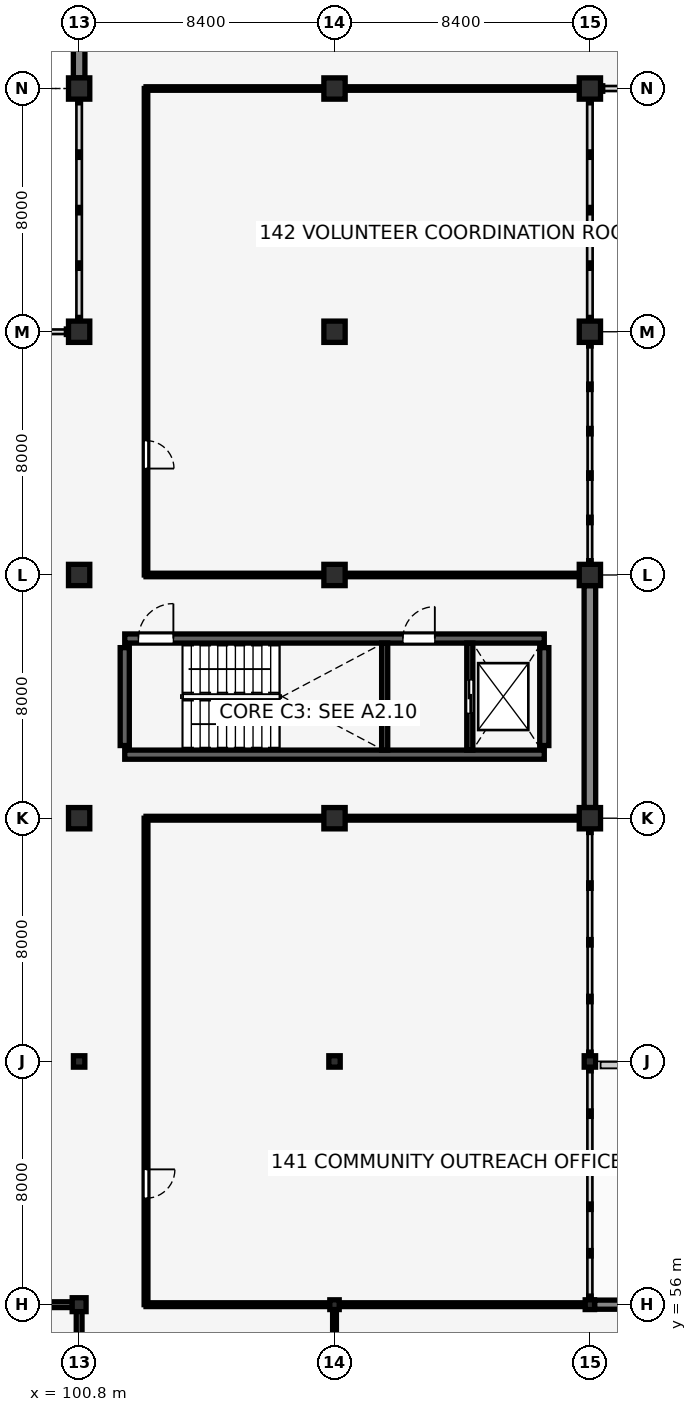
"""IFC4 building model, lengths in metres.
Left out: names, types, materials, properties, quantities, classifications, styles, units other than length and angle.
Written with IfcOpenShell. Run it as: python <this file> out.ifc"""

import sys

from ifc_helpers import new_model, si_unit, direction, frame, frame_2d, origin, origin_2d, place, context, subcontext, project, spatial, rectangle, hollow_circle, i_section, extrude, element, fill, save


model = new_model("IFC4")
c1 = context("Model", 3, precision=1e-05, world=origin(), true_north=direction((0.0, 1.0)))
c2 = subcontext(c1, "Body", "Model", "MODEL_VIEW")
j1 = project(units=[si_unit("LENGTHUNIT", "METRE"), si_unit("PLANEANGLEUNIT", "RADIAN")], contexts=[c1])
p1 = place(None, origin())
s1 = spatial("IfcSite", under=j1, at=p1, CompositionType="ELEMENT")
p2 = place(p1, origin())
s2 = spatial("IfcBuilding", under=s1, at=p2, CompositionType="ELEMENT")
p3 = place(p2, frame((0.0, 0.0, 5.44)))
s3 = spatial("IfcBuildingStorey", under=s2, at=p3, CompositionType="ELEMENT", Elevation=5.44)
p4 = place(p3, frame((102.3, 74.09, 0.0), z_axis=(0.0, 0.0, 1.0), x_axis=(1.0, 0.0, 0.0)))
e1 = element("IfcWall", 1, at=p4, inside=s3, PredefinedType="SHEAR", context=c2, shape_type="SweptSolid", body=[
    extrude(rectangle(XDim=13.8, YDim=0.3, at=frame_2d((6.9, 0.0))), origin(), (0.0, 0.0, 1.0), 3.8),
])
p5 = place(p3, frame((102.3, 77.91, 0.0), z_axis=(0.0, 0.0, 1.0), x_axis=(1.0, 0.0, 0.0)))
e2 = element("IfcWall", 2, at=p5, inside=s3, PredefinedType="SHEAR", context=c2, shape_type="SweptSolid", body=[
    extrude(rectangle(XDim=13.8, YDim=0.3, at=frame_2d((6.9, 0.0))), origin(), (0.0, 0.0, 1.0), 3.8),
])
p6 = place(p5, frame((0.45, 0.0, 0.0), z_axis=(0.0, 0.0, 1.0), x_axis=(1.0, 0.0, 0.0)))
e3 = element("IfcOpeningElement", 3, at=p6, cuts=e2, PredefinedType="OPENING", context=c2, shape_type="SweptSolid", body=[
    extrude(rectangle(XDim=1.15, YDim=2.15, at=frame_2d((0.575, 1.075))), frame((0.0, 0.16, 0.0), z_axis=(0.0, -1.0, 0.0), x_axis=(1.0, 0.0, 0.0)), (0.0, 0.0, 1.0), 0.32),
])
p7 = place(p5, frame((9.15, 0.0, 0.0), z_axis=(0.0, 0.0, 1.0), x_axis=(1.0, 0.0, 0.0)))
e4 = element("IfcOpeningElement", 4, at=p7, cuts=e2, PredefinedType="OPENING", context=c2, shape_type="SweptSolid", body=[
    extrude(rectangle(XDim=1.05, YDim=2.15, at=frame_2d((0.525, 1.075))), frame((0.0, 0.16, 0.0), z_axis=(0.0, -1.0, 0.0), x_axis=(1.0, 0.0, 0.0)), (0.0, 0.0, 1.0), 0.32),
])
for number, where, z_axis, x_axis in (
    (5, (102.3, 74.39, 0.0), (0.0, 0.0, 1.0), (0.0, 1.0, 0.0)),
    (6, (116.1, 74.39, 0.0), (0.0, 0.0, 1.0), (0.0, 1.0, 0.0)),
):
    element("IfcWall", number, at=place(p3, frame(where, z_axis=z_axis, x_axis=x_axis)), inside=s3, PredefinedType="SHEAR", context=c2, shape_type="SweptSolid", body=[
        extrude(rectangle(XDim=3.22, YDim=0.3, at=frame_2d((1.61, 0.0))), origin(), (0.0, 0.0, 1.0), 3.8),
    ])
p8 = place(p3, frame((100.8, 56.0, 0.0), z_axis=(0.0, 0.0, 1.0), x_axis=(1.0, 0.0, 0.0)))
e7 = element("IfcColumn", 7, at=p8, inside=s3, PredefinedType="COLUMN", context=c2, shape_type="SweptSolid", body=[
    extrude(hollow_circle(Radius=0.229, WallThickness=0.016, at=origin_2d()), origin(), (0.0, 0.0, 1.0), 16.31),
])
p9 = place(p3, frame((100.8, 64.0, 0.0), z_axis=(0.0, 0.0, 1.0), x_axis=(1.0, 0.0, 0.0)))
e8 = element("IfcColumn", 8, at=p9, inside=s3, PredefinedType="COLUMN", context=c2, shape_type="SweptSolid", body=[
    extrude(i_section(OverallWidth=0.375, OverallDepth=0.375, WebThickness=0.017, FlangeThickness=0.027, FilletRadius=0.015, at=origin_2d()), origin(), (0.0, 0.0, 1.0), 3.8),
])
for number, where, z_axis, x_axis in (
    (9, (100.8, 72.0, 0.0), (0.0, 0.0, 1.0), (1.0, 0.0, 0.0)),
    (10, (100.8, 80.0, 0.0), (0.0, 0.0, 1.0), (1.0, 0.0, 0.0)),
    (11, (100.8, 88.0, 0.0), (0.0, 0.0, 1.0), (1.0, 0.0, 0.0)),
    (12, (100.8, 96.0, 0.0), (0.0, 0.0, 1.0), (1.0, 0.0, 0.0)),
):
    element("IfcColumn", number, at=place(p3, frame(where, z_axis=z_axis, x_axis=x_axis)), inside=s3, PredefinedType="COLUMN", context=c2, shape_type="SweptSolid", body=[
        extrude(rectangle(XDim=0.7, YDim=0.7, at=origin_2d()), origin(), (0.0, 0.0, 1.0), 3.8),
    ])
p10 = place(p3, frame((109.2, 56.0, 0.0), z_axis=(0.0, 0.0, 1.0), x_axis=(1.0, 0.0, 0.0)))
e13 = element("IfcColumn", 13, at=p10, inside=s3, PredefinedType="COLUMN", context=c2, shape_type="SweptSolid", body=[
    extrude(i_section(OverallWidth=0.309, OverallDepth=0.321, WebThickness=0.014, FlangeThickness=0.022, FilletRadius=0.015, at=origin_2d()), origin(), (0.0, 0.0, 1.0), 3.8),
])
p11 = place(p3, frame((109.2, 64.0, 0.0), z_axis=(0.0, 0.0, 1.0), x_axis=(1.0, 0.0, 0.0)))
e14 = element("IfcColumn", 14, at=p11, inside=s3, PredefinedType="COLUMN", context=c2, shape_type="SweptSolid", body=[
    extrude(i_section(OverallWidth=0.375, OverallDepth=0.375, WebThickness=0.017, FlangeThickness=0.027, FilletRadius=0.015, at=origin_2d()), origin(), (0.0, 0.0, 1.0), 3.8),
])
for number, where, z_axis, x_axis in (
    (15, (109.2, 72.0, 0.0), (0.0, 0.0, 1.0), (1.0, 0.0, 0.0)),
    (16, (109.2, 80.0, 0.0), (0.0, 0.0, 1.0), (1.0, 0.0, 0.0)),
    (17, (109.2, 88.0, 0.0), (0.0, 0.0, 1.0), (1.0, 0.0, 0.0)),
    (18, (109.2, 96.0, 0.0), (0.0, 0.0, 1.0), (1.0, 0.0, 0.0)),
):
    element("IfcColumn", number, at=place(p3, frame(where, z_axis=z_axis, x_axis=x_axis)), inside=s3, PredefinedType="COLUMN", context=c2, shape_type="SweptSolid", body=[
        extrude(rectangle(XDim=0.7, YDim=0.7, at=origin_2d()), origin(), (0.0, 0.0, 1.0), 3.8),
    ])
p12 = place(p3, frame((117.6, 56.0, 0.0), z_axis=(0.0, 0.0, 1.0), x_axis=(1.0, 0.0, 0.0)))
e19 = element("IfcColumn", 19, at=p12, inside=s3, PredefinedType="COLUMN", context=c2, shape_type="SweptSolid", body=[
    extrude(i_section(OverallWidth=0.309, OverallDepth=0.321, WebThickness=0.014, FlangeThickness=0.022, FilletRadius=0.015, at=origin_2d()), origin(), (0.0, 0.0, 1.0), 3.8),
])
p13 = place(p3, frame((117.6, 64.0, 0.0), z_axis=(0.0, 0.0, 1.0), x_axis=(1.0, 0.0, 0.0)))
e20 = element("IfcColumn", 20, at=p13, inside=s3, PredefinedType="COLUMN", context=c2, shape_type="SweptSolid", body=[
    extrude(i_section(OverallWidth=0.375, OverallDepth=0.375, WebThickness=0.017, FlangeThickness=0.027, FilletRadius=0.015, at=origin_2d()), origin(), (0.0, 0.0, 1.0), 3.8),
])
for number, where, z_axis, x_axis in (
    (21, (117.6, 72.0, 0.0), (0.0, 0.0, 1.0), (1.0, 0.0, 0.0)),
    (22, (117.6, 80.0, 0.0), (0.0, 0.0, 1.0), (1.0, 0.0, 0.0)),
    (23, (117.6, 88.0, 0.0), (0.0, 0.0, 1.0), (1.0, 0.0, 0.0)),
    (24, (117.6, 96.0, 0.0), (0.0, 0.0, 1.0), (1.0, 0.0, 0.0)),
):
    element("IfcColumn", number, at=place(p3, frame(where, z_axis=z_axis, x_axis=x_axis)), inside=s3, PredefinedType="COLUMN", context=c2, shape_type="SweptSolid", body=[
        extrude(rectangle(XDim=0.7, YDim=0.7, at=origin_2d()), origin(), (0.0, 0.0, 1.0), 3.8),
    ])
p14 = place(p3, frame((100.8, 96.35, 0.0), z_axis=(0.0, 0.0, 1.0), x_axis=(0.0, 1.0, 0.0)))
e25 = element("IfcWall", 25, at=p14, inside=s3, PredefinedType="SOLIDWALL", context=c2, shape_type="SweptSolid", body=[
    extrude(rectangle(XDim=7.463, YDim=0.38, at=frame_2d((3.731, 0.0))), origin(), (0.0, 0.0, 1.0), 3.442),
])
p15 = place(p14, frame((2.231, 0.0, 0.9), z_axis=(0.0, 0.0, 1.0), x_axis=(1.0, 0.0, 0.0)))
e26 = element("IfcOpeningElement", 26, at=p15, cuts=e25, PredefinedType="OPENING", context=c2, shape_type="SweptSolid", body=[
    extrude(rectangle(XDim=3.0, YDim=1.65, at=frame_2d((1.5, 0.825))), frame((0.0, 0.2, 0.0), z_axis=(0.0, -1.0, 0.0), x_axis=(1.0, 0.0, 0.0)), (0.0, 0.0, 1.0), 0.4),
])
p16 = place(p3, frame((117.6, 72.35, 0.0), z_axis=(0.0, 0.0, 1.0), x_axis=(0.0, 1.0, 0.0)))
e27 = element("IfcWall", 27, at=p16, inside=s3, PredefinedType="SOLIDWALL", context=c2, shape_type="SweptSolid", body=[
    extrude(rectangle(XDim=7.3, YDim=0.38, at=frame_2d((3.65, 0.0))), origin(), (0.0, 0.0, 1.0), 3.5),
])
p17 = place(p3, frame((117.755, 56.0, 0.0), z_axis=(0.0, 0.0, 1.0), x_axis=(1.0, 0.0, 0.0)))
e28 = element("IfcWall", 28, at=p17, inside=s3, PredefinedType="SOLIDWALL", context=c2, shape_type="SweptSolid", body=[
    extrude(rectangle(XDim=8.091, YDim=0.3, at=frame_2d((4.045, 0.0))), origin(), (0.0, 0.0, 1.0), 3.45),
])
p18 = place(p17, frame((2.445, 0.0, 0.9), z_axis=(0.0, 0.0, 1.0), x_axis=(1.0, 0.0, 0.0)))
e29 = element("IfcOpeningElement", 29, at=p18, cuts=e28, PredefinedType="OPENING", context=c2, shape_type="SweptSolid", body=[
    extrude(rectangle(XDim=3.2, YDim=1.65, at=frame_2d((1.6, 0.825))), frame((0.0, 0.16, 0.0), z_axis=(0.0, -1.0, 0.0), x_axis=(1.0, 0.0, 0.0)), (0.0, 0.0, 1.0), 0.32),
])
p19 = place(p3, frame((117.95, 63.88, 0.0), z_axis=(0.0, 0.0, 1.0), x_axis=(1.0, 0.0, 0.0)))
e30 = element("IfcWall", 30, at=p19, inside=s3, PredefinedType="PARAPET", context=c2, shape_type="SweptSolid", body=[
    extrude(rectangle(XDim=32.9, YDim=0.215, at=frame_2d((16.45, 0.0))), origin(), (0.0, 0.0, 1.0), 1.05),
])
p20 = place(p3, frame((110.85, 74.24, 0.0), z_axis=(0.0, 0.0, 1.0), x_axis=(0.0, 1.0, 0.0)))
e31 = element("IfcWall", 31, at=p20, inside=s3, PredefinedType="SHEAR", context=c2, shape_type="SweptSolid", body=[
    extrude(rectangle(XDim=3.52, YDim=0.2, at=frame_2d((1.76, 0.0))), origin(), (0.0, 0.0, 1.0), 3.8),
])
p21 = place(p3, frame((113.65, 74.24, 0.0), z_axis=(0.0, 0.0, 1.0), x_axis=(0.0, 1.0, 0.0)))
e32 = element("IfcWall", 32, at=p21, inside=s3, PredefinedType="SHEAR", context=c2, shape_type="SweptSolid", body=[
    extrude(rectangle(XDim=3.52, YDim=0.2, at=frame_2d((1.76, 0.0))), origin(), (0.0, 0.0, 1.0), 3.8),
])
p22 = place(p21, frame((1.21, 0.0, 0.0), z_axis=(0.0, 0.0, 1.0), x_axis=(1.0, 0.0, 0.0)))
e33 = element("IfcOpeningElement", 33, at=p22, cuts=e32, PredefinedType="OPENING", context=c2, shape_type="SweptSolid", body=[
    extrude(rectangle(XDim=1.1, YDim=2.15, at=frame_2d((0.55, 1.075))), frame((0.0, 0.11, 0.0), z_axis=(0.0, -1.0, 0.0), x_axis=(1.0, 0.0, 0.0)), (0.0, 0.0, 1.0), 0.22),
])
p23 = place(p3, frame((103.0, 56.0, 0.0), z_axis=(0.0, 0.0, 1.0), x_axis=(0.0, 1.0, 0.0)))
e34 = element("IfcWall", 34, at=p23, inside=s3, PredefinedType="PARTITIONING", context=c2, shape_type="SweptSolid", body=[
    extrude(rectangle(XDim=16.0, YDim=0.125, at=frame_2d((8.0, 0.0))), origin(), (0.0, 0.0, 1.0), 3.8),
])
p24 = place(p23, frame((4.45, 0.0, 0.0), z_axis=(0.0, 0.0, 1.0), x_axis=(-1.0, 0.0, 0.0)))
e35 = element("IfcOpeningElement", 35, at=p24, cuts=e34, PredefinedType="OPENING", context=c2, shape_type="SweptSolid", body=[
    extrude(rectangle(XDim=0.95, YDim=2.15, at=frame_2d((0.475, 1.075))), frame((0.0, 0.073, 0.0), z_axis=(0.0, -1.0, 0.0), x_axis=(1.0, 0.0, 0.0)), (0.0, 0.0, 1.0), 0.145),
])
p25 = place(p3, frame((103.0, 80.0, 0.0), z_axis=(0.0, 0.0, 1.0), x_axis=(0.0, 1.0, 0.0)))
e36 = element("IfcWall", 36, at=p25, inside=s3, PredefinedType="PARTITIONING", context=c2, shape_type="SweptSolid", body=[
    extrude(rectangle(XDim=16.0, YDim=0.115, at=frame_2d((8.0, 0.0))), origin(), (0.0, 0.0, 1.0), 3.8),
])
p26 = place(p25, frame((4.42, 0.0, 0.0), z_axis=(0.0, 0.0, 1.0), x_axis=(-1.0, 0.0, 0.0)))
e37 = element("IfcOpeningElement", 37, at=p26, cuts=e36, PredefinedType="OPENING", context=c2, shape_type="SweptSolid", body=[
    extrude(rectangle(XDim=0.92, YDim=2.12, at=frame_2d((0.46, 1.06))), frame((0.0, 0.067, 0.0), z_axis=(0.0, -1.0, 0.0), x_axis=(1.0, 0.0, 0.0)), (0.0, 0.0, 1.0), 0.135),
])
p27 = place(p3, frame((92.618, 56.0, 0.0), z_axis=(0.0, 0.0, 1.0), x_axis=(1.0, 0.0, 0.0)))
e38 = element("IfcWall", 38, at=p27, inside=s3, PredefinedType="PLUMBINGWALL", context=c2, shape_type="SweptSolid", body=[
    extrude(rectangle(XDim=7.963, YDim=0.19, at=frame_2d((3.981, 0.0))), origin(), (0.0, 0.0, 1.0), 3.8),
])
p28 = place(p3, frame((100.8, 48.15, 0.0), z_axis=(0.0, 0.0, 1.0), x_axis=(0.0, 1.0, 0.0)))
e39 = element("IfcWall", 39, at=p28, inside=s3, PredefinedType="PLUMBINGWALL", context=c2, shape_type="SweptSolid", body=[
    extrude(rectangle(XDim=7.631, YDim=0.19, at=frame_2d((3.815, 0.0))), origin(), (0.0, 0.0, 1.0), 3.337),
])
p29 = place(p3, frame((109.344, 56.0, 0.0), z_axis=(0.0, 0.0, 1.0), x_axis=(1.0, 0.0, 0.0)))
e40 = element("IfcWall", 40, at=p29, inside=s3, PredefinedType="PARTITIONING", context=c2, shape_type="SweptSolid", body=[
    extrude(rectangle(XDim=8.111, YDim=0.125, at=frame_2d((4.055, 0.0))), origin(), (0.0, 0.0, 1.0), 3.26),
])
p30 = place(p3, frame((109.2, 48.15, 0.0), z_axis=(0.0, 0.0, 1.0), x_axis=(0.0, 1.0, 0.0)))
e41 = element("IfcWall", 41, at=p30, inside=s3, PredefinedType="PARTITIONING", context=c2, shape_type="SweptSolid", body=[
    extrude(rectangle(XDim=7.699, YDim=0.125, at=frame_2d((3.85, 0.0))), origin(), (0.0, 0.0, 1.0), 3.337),
])
p31 = place(p3, frame((103.0, 56.0, 0.0), z_axis=(0.0, 0.0, 1.0), x_axis=(1.0, 0.0, 0.0)))
e42 = element("IfcWall", 42, at=p31, inside=s3, PredefinedType="PARTITIONING", context=c2, shape_type="SweptSolid", body=[
    extrude(rectangle(XDim=6.055, YDim=0.125, at=frame_2d((3.028, 0.0))), origin(), (0.0, 0.0, 1.0), 3.26),
])
p32 = place(p3, frame((103.0, 72.0, 0.0), z_axis=(0.0, 0.0, 1.0), x_axis=(1.0, 0.0, 0.0)))
e43 = element("IfcWall", 43, at=p32, inside=s3, PredefinedType="PARTITIONING", context=c2, shape_type="SweptSolid", body=[
    extrude(rectangle(XDim=5.86, YDim=0.125, at=frame_2d((2.93, 0.0))), origin(), (0.0, 0.0, 1.0), 3.26),
])
p33 = place(p3, frame((109.54, 72.0, 0.0), z_axis=(0.0, 0.0, 1.0), x_axis=(1.0, 0.0, 0.0)))
e44 = element("IfcWall", 44, at=p33, inside=s3, PredefinedType="PARTITIONING", context=c2, shape_type="SweptSolid", body=[
    extrude(rectangle(XDim=7.72, YDim=0.125, at=frame_2d((3.86, 0.0))), origin(), (0.0, 0.0, 1.0), 3.26),
])
p34 = place(p3, frame((103.0, 80.0, 0.0), z_axis=(0.0, 0.0, 1.0), x_axis=(1.0, 0.0, 0.0)))
e45 = element("IfcWall", 45, at=p34, inside=s3, PredefinedType="PARTITIONING", context=c2, shape_type="SweptSolid", body=[
    extrude(rectangle(XDim=5.86, YDim=0.115, at=frame_2d((2.93, 0.0))), origin(), (0.0, 0.0, 1.0), 3.26),
])
p35 = place(p3, frame((109.54, 80.0, 0.0), z_axis=(0.0, 0.0, 1.0), x_axis=(1.0, 0.0, 0.0)))
e46 = element("IfcWall", 46, at=p35, inside=s3, PredefinedType="PARTITIONING", context=c2, shape_type="SweptSolid", body=[
    extrude(rectangle(XDim=7.72, YDim=0.115, at=frame_2d((3.86, 0.0))), origin(), (0.0, 0.0, 1.0), 3.26),
])
p36 = place(p3, frame((103.0, 96.0, 0.0), z_axis=(0.0, 0.0, 1.0), x_axis=(1.0, 0.0, 0.0)))
e47 = element("IfcWall", 47, at=p36, inside=s3, PredefinedType="PARTITIONING", context=c2, shape_type="SweptSolid", body=[
    extrude(rectangle(XDim=5.86, YDim=0.115, at=frame_2d((2.93, 0.0))), origin(), (0.0, 0.0, 1.0), 3.26),
])
p37 = place(p3, frame((109.54, 96.0, 0.0), z_axis=(0.0, 0.0, 1.0), x_axis=(1.0, 0.0, 0.0)))
e48 = element("IfcWall", 48, at=p37, inside=s3, PredefinedType="PARTITIONING", context=c2, shape_type="SweptSolid", body=[
    extrude(rectangle(XDim=7.72, YDim=0.115, at=frame_2d((3.86, 0.0))), origin(), (0.0, 0.0, 1.0), 3.26),
])
p38 = place(p6, origin())
e49 = element("IfcDoor", 49, at=p38, inside=s3, OperationType="SINGLE_SWING_RIGHT", PredefinedType="DOOR", context=c2, shape_type="SweptSolid", body=[
    extrude(rectangle(XDim=1.15, YDim=2.15, at=frame_2d((0.575, 1.075))), frame((0.0, 0.025, 0.0), z_axis=(0.0, -1.0, 0.0), x_axis=(1.0, 0.0, 0.0)), (0.0, 0.0, 1.0), 0.05),
])
fill(e3, e49)
p39 = place(p7, origin())
e50 = element("IfcDoor", 50, at=p39, inside=s3, OperationType="SINGLE_SWING_RIGHT", PredefinedType="DOOR", context=c2, shape_type="SweptSolid", body=[
    extrude(rectangle(XDim=1.05, YDim=2.15, at=frame_2d((0.525, 1.075))), frame((0.0, 0.025, 0.0), z_axis=(0.0, -1.0, 0.0), x_axis=(1.0, 0.0, 0.0)), (0.0, 0.0, 1.0), 0.05),
])
fill(e4, e50)
p40 = place(p22, origin())
e51 = element("IfcDoor", 51, at=p40, inside=s3, OperationType="DOUBLE_DOOR_SLIDING", PredefinedType="DOOR", context=c2, shape_type="SweptSolid", body=[
    extrude(rectangle(XDim=1.1, YDim=2.15, at=frame_2d((0.55, 1.075))), frame((0.0, 0.025, 0.0), z_axis=(0.0, -1.0, 0.0), x_axis=(1.0, 0.0, 0.0)), (0.0, 0.0, 1.0), 0.05),
])
fill(e33, e51)
p41 = place(p24, origin())
e52 = element("IfcDoor", 52, at=p41, inside=s3, OperationType="SINGLE_SWING_LEFT", PredefinedType="DOOR", context=c2, shape_type="SweptSolid", body=[
    extrude(rectangle(XDim=0.95, YDim=2.15, at=frame_2d((0.475, 1.075))), frame((0.0, 0.025, 0.0), z_axis=(0.0, -1.0, 0.0), x_axis=(1.0, 0.0, 0.0)), (0.0, 0.0, 1.0), 0.05),
])
fill(e35, e52)
p42 = place(p26, origin())
e53 = element("IfcDoor", 53, at=p42, inside=s3, OperationType="SINGLE_SWING_RIGHT", PredefinedType="DOOR", context=c2, shape_type="SweptSolid", body=[
    extrude(rectangle(XDim=0.92, YDim=2.12, at=frame_2d((0.46, 1.06))), frame((0.0, 0.025, 0.0), z_axis=(0.0, -1.0, 0.0), x_axis=(1.0, 0.0, 0.0)), (0.0, 0.0, 1.0), 0.05),
])
fill(e37, e53)
save(model, sys.argv[1])
